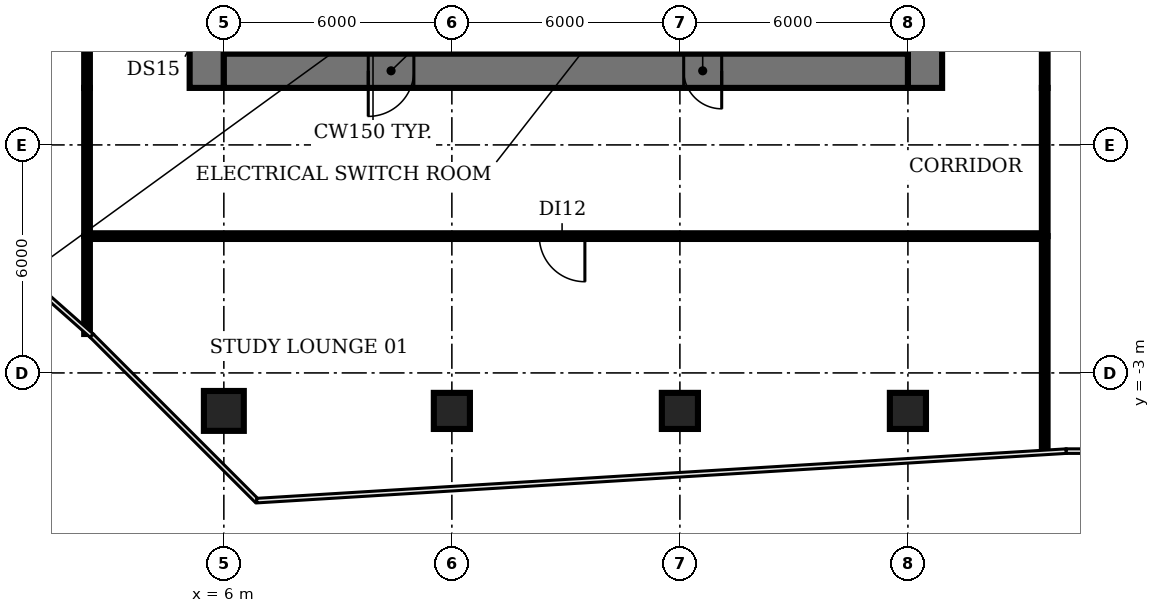
"""IFC4 building model, lengths in metres.
Left out: names, types, materials, properties, quantities, classifications, styles, units other than length and angle.
Written with IfcOpenShell. Run it as: python <this file> out.ifc"""

import sys

from ifc_helpers import new_model, si_unit, direction, frame, frame_2d, origin, origin_2d, place, context, subcontext, project, spatial, rectangle, circle, extrude, element, fill, save


model = new_model("IFC4")
c1 = context("Model", 3, precision=1e-05, world=origin(), true_north=direction((0.0, 1.0)))
c2 = subcontext(c1, "Body", "Model", "MODEL_VIEW")
j1 = project(units=[si_unit("LENGTHUNIT", "METRE"), si_unit("PLANEANGLEUNIT", "RADIAN")], contexts=[c1])
p1 = place(None, origin())
s1 = spatial("IfcSite", under=j1, at=p1, CompositionType="ELEMENT")
p2 = place(p1, origin())
s2 = spatial("IfcBuilding", under=s1, at=p2, CompositionType="ELEMENT")
p3 = place(p2, frame((0.0, 0.0, 66.8)))
s3 = spatial("IfcBuildingStorey", under=s2, at=p3, CompositionType="ELEMENT", Elevation=66.8)
p4 = place(p3, frame((6.0, -4.0, 0.0), z_axis=(0.0, 0.0, 1.0), x_axis=(1.0, 0.0, 0.0)))
e1 = element("IfcColumn", 1, at=p4, inside=s3, PredefinedType="COLUMN", context=c2, shape_type="SweptSolid", body=[
    extrude(circle(Radius=0.525, at=origin_2d()), origin(), (0.0, 0.0, 1.0), 3.85),
])
for number, where, z_axis, x_axis in (
    (2, (12.0, -4.0, 0.0), (0.0, 0.0, 1.0), (1.0, 0.0, 0.0)),
    (3, (18.0, -4.0, 0.0), (0.0, 0.0, 1.0), (1.0, 0.0, 0.0)),
    (4, (24.0, -4.0, 0.0), (0.0, 0.0, 1.0), (1.0, 0.0, 0.0)),
):
    element("IfcColumn", number, at=place(p3, frame(where, z_axis=z_axis, x_axis=x_axis)), inside=s3, PredefinedType="COLUMN", context=c2, shape_type="SweptSolid", body=[
        extrude(rectangle(XDim=0.95, YDim=0.95, at=origin_2d()), origin(), (0.0, 0.0, 1.0), 3.85),
    ])
p5 = place(p3, frame((9.275, 11.825, 0.0), z_axis=(0.0, 0.0, 1.0), x_axis=(0.0, -1.0, 0.0)))
e5 = element("IfcWall", 5, at=p5, inside=s3, PredefinedType="SHEAR", context=c2, shape_type="SweptSolid", body=[
    extrude(rectangle(XDim=6.425, YDim=0.25, at=frame_2d((3.212, 0.0))), origin(), (0.0, 0.0, 1.0), 3.85),
])
p6 = place(p5, frame((5.075, 0.0, 0.0)))
e6 = element("IfcOpeningElement", 6, at=p6, cuts=e5, PredefinedType="OPENING", context=c2, shape_type="SweptSolid", body=[
    extrude(rectangle(XDim=1.0, YDim=2.1, at=frame_2d((0.5, 1.05))), frame((0.0, 0.135, 0.0), z_axis=(0.0, -1.0, 0.0), x_axis=(1.0, 0.0, 0.0)), (0.0, 0.0, 1.0), 0.27),
])
p7 = place(p3, frame((13.5, 5.4, 0.0), z_axis=(0.0, 0.0, 1.0), x_axis=(0.0, 1.0, 0.0)))
e7 = element("IfcWall", 7, at=p7, inside=s3, PredefinedType="SHEAR", context=c2, shape_type="SweptSolid", body=[
    extrude(rectangle(XDim=8.2, YDim=0.2, at=frame_2d((4.1, 0.0))), origin(), (0.0, 0.0, 1.0), 3.85),
])
p8 = place(p7, frame((0.75, 0.0, 0.0)))
e8 = element("IfcOpeningElement", 8, at=p8, cuts=e7, PredefinedType="OPENING", context=c2, shape_type="SweptSolid", body=[
    extrude(rectangle(XDim=1.1, YDim=2.1, at=frame_2d((0.55, 1.05))), frame((0.0, 0.11, 0.0), z_axis=(0.0, -1.0, 0.0), x_axis=(1.0, 0.0, 0.0)), (0.0, 0.0, 1.0), 0.22),
])
p9 = place(p7, frame((3.55, 0.0, 0.0)))
e9 = element("IfcOpeningElement", 9, at=p9, cuts=e7, PredefinedType="OPENING", context=c2, shape_type="SweptSolid", body=[
    extrude(rectangle(XDim=1.1, YDim=2.1, at=frame_2d((0.55, 1.05))), frame((0.0, 0.11, 0.0), z_axis=(0.0, -1.0, 0.0), x_axis=(1.0, 0.0, 0.0)), (0.0, 0.0, 1.0), 0.22),
])
p10 = place(p7, frame((6.35, 0.0, 0.0)))
e10 = element("IfcOpeningElement", 10, at=p10, cuts=e7, PredefinedType="OPENING", context=c2, shape_type="SweptSolid", body=[
    extrude(rectangle(XDim=1.1, YDim=2.1, at=frame_2d((0.55, 1.05))), frame((0.0, 0.11, 0.0), z_axis=(0.0, -1.0, 0.0), x_axis=(1.0, 0.0, 0.0)), (0.0, 0.0, 1.0), 0.22),
])
p11 = place(p3, frame((16.5, 5.4, 0.0), z_axis=(0.0, 0.0, 1.0), x_axis=(0.0, 1.0, 0.0)))
e11 = element("IfcWall", 11, at=p11, inside=s3, PredefinedType="SHEAR", context=c2, shape_type="SweptSolid", body=[
    extrude(rectangle(XDim=8.2, YDim=0.2, at=frame_2d((4.1, 0.0))), origin(), (0.0, 0.0, 1.0), 3.85),
])
p12 = place(p3, frame((20.725, 5.4, 0.0), z_axis=(0.0, 0.0, 1.0), x_axis=(0.0, 1.0, 0.0)))
e12 = element("IfcWall", 12, at=p12, inside=s3, PredefinedType="SHEAR", context=c2, shape_type="SweptSolid", body=[
    extrude(rectangle(XDim=8.2, YDim=0.25, at=frame_2d((4.1, 0.0))), origin(), (0.0, 0.0, 1.0), 3.85),
])
p13 = place(p3, frame((5.55, 4.5, 0.0), z_axis=(0.0, 0.0, 1.0), x_axis=(0.0, 1.0, 0.0)))
e13 = element("IfcWall", 13, at=p13, inside=s3, PredefinedType="SHEAR", context=c2, shape_type="SweptSolid", body=[
    extrude(rectangle(XDim=21.2, YDim=0.9, at=frame_2d((10.6, 0.0))), origin(), (0.0, 0.0, 1.0), 3.85),
])
p14 = place(p13, frame((1.15, 0.0, 0.0)))
e14 = element("IfcOpeningElement", 14, at=p14, cuts=e13, PredefinedType="OPENING", context=c2, shape_type="SweptSolid", body=[
    extrude(rectangle(XDim=1.5, YDim=2.1, at=frame_2d((0.75, 1.05))), frame((0.0, 0.46, 0.0), z_axis=(0.0, -1.0, 0.0), x_axis=(1.0, 0.0, 0.0)), (0.0, 0.0, 1.0), 0.92),
])
p15 = place(p13, frame((7.6, 0.0, 0.0)))
e15 = element("IfcOpeningElement", 15, at=p15, cuts=e13, PredefinedType="OPENING", context=c2, shape_type="SweptSolid", body=[
    extrude(rectangle(XDim=1.2, YDim=2.1, at=frame_2d((0.6, 1.05))), frame((0.0, 0.46, 0.0), z_axis=(0.0, -1.0, 0.0), x_axis=(1.0, 0.0, 0.0)), (0.0, 0.0, 1.0), 0.92),
])
p16 = place(p13, frame((14.15, 0.0, 0.0)))
e16 = element("IfcOpeningElement", 16, at=p16, cuts=e13, PredefinedType="OPENING", context=c2, shape_type="SweptSolid", body=[
    extrude(rectangle(XDim=1.2, YDim=2.1, at=frame_2d((0.6, 1.05))), frame((0.0, 0.46, 0.0), z_axis=(0.0, -1.0, 0.0), x_axis=(1.0, 0.0, 0.0)), (0.0, 0.0, 1.0), 0.92),
])
p17 = place(p3, frame((24.45, 25.7, 0.0), z_axis=(0.0, 0.0, 1.0), x_axis=(0.0, -1.0, 0.0)))
e17 = element("IfcWall", 17, at=p17, inside=s3, PredefinedType="SHEAR", context=c2, shape_type="SweptSolid", body=[
    extrude(rectangle(XDim=21.2, YDim=0.9, at=frame_2d((10.6, 0.0))), origin(), (0.0, 0.0, 1.0), 3.85),
])
p18 = place(p17, frame((18.55, 0.0, 0.0)))
e18 = element("IfcOpeningElement", 18, at=p18, cuts=e17, PredefinedType="OPENING", context=c2, shape_type="SweptSolid", body=[
    extrude(rectangle(XDim=1.5, YDim=2.1, at=frame_2d((0.75, 1.05))), frame((0.0, 0.46, 0.0), z_axis=(0.0, -1.0, 0.0), x_axis=(1.0, 0.0, 0.0)), (0.0, 0.0, 1.0), 0.92),
])
p19 = place(p17, frame((12.45, 0.0, 0.0)))
e19 = element("IfcOpeningElement", 19, at=p19, cuts=e17, PredefinedType="OPENING", context=c2, shape_type="SweptSolid", body=[
    extrude(rectangle(XDim=0.9, YDim=2.1, at=frame_2d((0.45, 1.05))), frame((0.0, 0.46, 0.0), z_axis=(0.0, -1.0, 0.0), x_axis=(1.0, 0.0, 0.0)), (0.0, 0.0, 1.0), 0.92),
])
p20 = place(p17, frame((6.45, 0.0, 0.0)))
e20 = element("IfcOpeningElement", 20, at=p20, cuts=e17, PredefinedType="OPENING", context=c2, shape_type="SweptSolid", body=[
    extrude(rectangle(XDim=2.0, YDim=2.1, at=frame_2d((1.0, 1.05))), frame((0.0, 0.46, 0.0), z_axis=(0.0, -1.0, 0.0), x_axis=(1.0, 0.0, 0.0)), (0.0, 0.0, 1.0), 0.92),
])
p21 = place(p3, frame((24.0, 4.95, 0.0), z_axis=(0.0, 0.0, 1.0), x_axis=(-1.0, 0.0, 0.0)))
e21 = element("IfcWall", 21, at=p21, inside=s3, PredefinedType="SHEAR", context=c2, shape_type="SweptSolid", body=[
    extrude(rectangle(XDim=18.0, YDim=0.9, at=frame_2d((9.0, 0.0))), origin(), (0.0, 0.0, 1.0), 3.85),
])
p22 = place(p21, frame((13.0, 0.0, 0.0)))
e22 = element("IfcOpeningElement", 22, at=p22, cuts=e21, PredefinedType="OPENING", context=c2, shape_type="SweptSolid", body=[
    extrude(rectangle(XDim=1.2, YDim=2.1, at=frame_2d((0.6, 1.05))), frame((0.0, 0.46, 0.0), z_axis=(0.0, -1.0, 0.0), x_axis=(1.0, 0.0, 0.0)), (0.0, 0.0, 1.0), 0.92),
])
p23 = place(p21, frame((4.9, 0.0, 0.0)))
e23 = element("IfcOpeningElement", 23, at=p23, cuts=e21, PredefinedType="OPENING", context=c2, shape_type="SweptSolid", body=[
    extrude(rectangle(XDim=1.0, YDim=2.1, at=frame_2d((0.5, 1.05))), frame((0.0, 0.46, 0.0), z_axis=(0.0, -1.0, 0.0), x_axis=(1.0, 0.0, 0.0)), (0.0, 0.0, 1.0), 0.92),
])
p24 = place(p3, frame((2.4, -1.976, 0.0), z_axis=(0.0, 0.0, 1.0), x_axis=(0.0, 1.0, 0.0)))
e24 = element("IfcWall", 24, at=p24, inside=s3, PredefinedType="PARTITIONING", context=c2, shape_type="SweptSolid", body=[
    extrude(rectangle(XDim=2.576, YDim=0.15, at=frame_2d((1.288, 0.0))), origin(), (0.0, 0.0, 1.0), 2.83),
])
p25 = place(p3, frame((2.4, 0.6, 0.0), z_axis=(0.0, 0.0, 1.0), x_axis=(0.0, 1.0, 0.0)))
e25 = element("IfcWall", 25, at=p25, inside=s3, PredefinedType="PARTITIONING", context=c2, shape_type="SweptSolid", body=[
    extrude(rectangle(XDim=3.9, YDim=0.15, at=frame_2d((1.95, 0.0))), origin(), (0.0, 0.0, 1.0), 2.83),
])
p26 = place(p3, frame((2.4, 4.5, 0.0), z_axis=(0.0, 0.0, 1.0), x_axis=(0.0, 1.0, 0.0)))
e26 = element("IfcWall", 26, at=p26, inside=s3, PredefinedType="PARTITIONING", context=c2, shape_type="SweptSolid", body=[
    extrude(rectangle(XDim=21.2, YDim=0.15, at=frame_2d((10.6, 0.0))), origin(), (0.0, 0.0, 1.0), 2.83),
])
p27 = place(p26, frame((10.8, 0.0, 0.0)))
e27 = element("IfcOpeningElement", 27, at=p27, cuts=e26, PredefinedType="OPENING", context=c2, shape_type="SweptSolid", body=[
    extrude(rectangle(XDim=1.2, YDim=2.1, at=frame_2d((0.6, 1.05))), frame((0.0, 0.085, 0.0), z_axis=(0.0, -1.0, 0.0), x_axis=(1.0, 0.0, 0.0)), (0.0, 0.0, 1.0), 0.17),
])
p28 = place(p3, frame((27.6, -5.04, 0.0), z_axis=(0.0, 0.0, 1.0), x_axis=(0.0, 1.0, 0.0)))
e28 = element("IfcWall", 28, at=p28, inside=s3, PredefinedType="PARTITIONING", context=c2, shape_type="SweptSolid", body=[
    extrude(rectangle(XDim=5.64, YDim=0.15, at=frame_2d((2.82, 0.0))), origin(), (0.0, 0.0, 1.0), 2.83),
])
p29 = place(p3, frame((27.6, 0.6, 0.0), z_axis=(0.0, 0.0, 1.0), x_axis=(-1.0, 0.0, 0.0)))
e29 = element("IfcWall", 29, at=p29, inside=s3, PredefinedType="PARTITIONING", context=c2, shape_type="SweptSolid", body=[
    extrude(rectangle(XDim=25.2, YDim=0.15, at=frame_2d((12.6, 0.0))), origin(), (0.0, 0.0, 1.0), 2.83),
])
p30 = place(p29, frame((12.1, 0.0, 0.0)))
e30 = element("IfcOpeningElement", 30, at=p30, cuts=e29, PredefinedType="OPENING", context=c2, shape_type="SweptSolid", body=[
    extrude(rectangle(XDim=1.2, YDim=2.1, at=frame_2d((0.6, 1.05))), frame((0.0, 0.085, 0.0), z_axis=(0.0, -1.0, 0.0), x_axis=(1.0, 0.0, 0.0)), (0.0, 0.0, 1.0), 0.17),
])
p31 = place(p3, frame((27.6, 0.6, 0.0), z_axis=(0.0, 0.0, 1.0), x_axis=(0.0, 1.0, 0.0)))
e31 = element("IfcWall", 31, at=p31, inside=s3, PredefinedType="PARTITIONING", context=c2, shape_type="SweptSolid", body=[
    extrude(rectangle(XDim=3.9, YDim=0.15, at=frame_2d((1.95, 0.0))), origin(), (0.0, 0.0, 1.0), 2.83),
])
p32 = place(p3, frame((27.6, 15.0, 0.0), z_axis=(0.0, 0.0, 1.0), x_axis=(0.0, -1.0, 0.0)))
e32 = element("IfcWall", 32, at=p32, inside=s3, PredefinedType="PARTITIONING", context=c2, shape_type="SweptSolid", body=[
    extrude(rectangle(XDim=10.5, YDim=0.15, at=frame_2d((5.25, 0.0))), origin(), (0.0, 0.0, 1.0), 2.83),
])
p33 = place(p32, frame((4.8, 0.0, 0.0)))
e33 = element("IfcOpeningElement", 33, at=p33, cuts=e32, PredefinedType="OPENING", context=c2, shape_type="SweptSolid", body=[
    extrude(rectangle(XDim=1.0, YDim=2.1, at=frame_2d((0.5, 1.05))), frame((0.0, 0.085, 0.0), z_axis=(0.0, -1.0, 0.0), x_axis=(1.0, 0.0, 0.0)), (0.0, 0.0, 1.0), 0.17),
])
p34 = place(p22, origin())
e34 = element("IfcDoor", 34, at=p34, inside=s3, OperationType="SINGLE_SWING_RIGHT", PredefinedType="DOOR", context=c2, shape_type="SweptSolid", body=[
    extrude(rectangle(XDim=1.2, YDim=2.1, at=frame_2d((0.6, 1.05))), frame((0.0, 0.025, 0.0), z_axis=(0.0, -1.0, 0.0), x_axis=(1.0, 0.0, 0.0)), (0.0, 0.0, 1.0), 0.05),
])
fill(e22, e34)
p35 = place(p23, origin())
e35 = element("IfcDoor", 35, at=p35, inside=s3, OperationType="SINGLE_SWING_LEFT", PredefinedType="DOOR", context=c2, shape_type="SweptSolid", body=[
    extrude(rectangle(XDim=1.0, YDim=2.1, at=frame_2d((0.5, 1.05))), frame((0.0, -0.39, 0.0), z_axis=(0.0, -1.0, 0.0), x_axis=(1.0, 0.0, 0.0)), (0.0, 0.0, 1.0), 0.05),
])
fill(e23, e35)
p36 = place(p30, origin())
e36 = element("IfcDoor", 36, at=p36, inside=s3, OperationType="SINGLE_SWING_LEFT", PredefinedType="DOOR", context=c2, shape_type="SweptSolid", body=[
    extrude(rectangle(XDim=1.2, YDim=2.1, at=frame_2d((0.6, 1.05))), frame((0.0, 0.025, 0.0), z_axis=(0.0, -1.0, 0.0), x_axis=(1.0, 0.0, 0.0)), (0.0, 0.0, 1.0), 0.05),
])
fill(e30, e36)
save(model, sys.argv[1])
